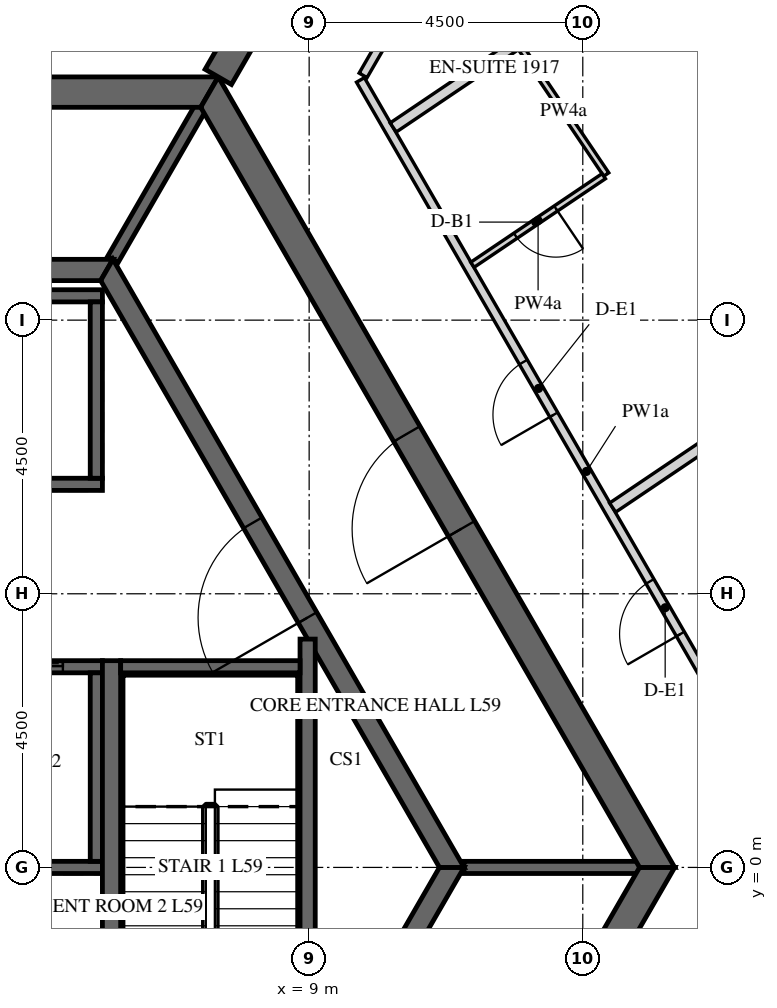
"""IFC4 building model, lengths in metres.
Left out: names, types, materials, properties, quantities, classifications, styles, units other than length and angle.
Written with IfcOpenShell. Run it as: python <this file> out.ifc"""

import sys

from ifc_helpers import new_model, si_unit, direction, frame, frame_2d, origin, place, context, subcontext, project, spatial, polyline, rectangle, outline, extrude, element, fill, save


model = new_model("IFC4")
c1 = context("Model", 3, precision=1e-05, world=origin(), true_north=direction((0.0, 1.0)))
c2 = subcontext(c1, "Body", "Model", "MODEL_VIEW")
j1 = project(units=[si_unit("LENGTHUNIT", "METRE"), si_unit("PLANEANGLEUNIT", "RADIAN")], contexts=[c1])
p1 = place(None, origin())
s1 = spatial("IfcSite", under=j1, at=p1, CompositionType="ELEMENT")
p2 = place(p1, origin())
s2 = spatial("IfcBuilding", under=s1, at=p2, CompositionType="ELEMENT")
p3 = place(p2, frame((0.0, 0.0, 246.3)))
s3 = spatial("IfcBuildingStorey", under=s2, at=p3, CompositionType="ELEMENT", Elevation=246.3)
p4 = place(p3, frame((7.361, -12.75, -0.15), z_axis=(0.0, 0.0, 1.0), x_axis=(0.50000571537, 0.866022103989, 0.0)))
e1 = element("IfcWall", 1, at=p4, inside=s3, PredefinedType="SHEAR", context=c2, shape_type="SweptSolid", body=[
    extrude(outline(polyline([(-0.144, -0.25), (14.867, -0.25), (14.578, 0.25), (0.144, 0.25), (-0.144, -0.25)])), origin(), (0.0, 0.0, 1.0), 3.75),
])
p5 = place(p4, frame((6.49, 0.0, 0.15)))
e2 = element("IfcOpeningElement", 2, at=p5, cuts=e1, PredefinedType="OPENING", context=c2, shape_type="SweptSolid", body=[
    extrude(rectangle(XDim=1.8, YDim=2.4, at=frame_2d((0.9, 1.2))), frame((0.0, 0.26, 0.0), z_axis=(0.0, -1.0, 0.0), x_axis=(1.0, 0.0, 0.0)), (0.0, 0.0, 1.0), 0.52),
])
p6 = place(p3, frame((14.722, 0.0, -0.15), z_axis=(0.0, 0.0, 1.0), x_axis=(-0.50000571537, 0.866022103989, 0.0)))
e3 = element("IfcWall", 3, at=p6, inside=s3, PredefinedType="SHEAR", context=c2, shape_type="SweptSolid", body=[
    extrude(outline(polyline([(-0.144, -0.25), (14.867, -0.25), (14.578, 0.25), (0.144, 0.25), (-0.144, -0.25)])), origin(), (0.0, 0.0, 1.0), 3.75),
])
p7 = place(p6, frame((6.432, 0.0, 0.15)))
e4 = element("IfcOpeningElement", 4, at=p7, cuts=e3, PredefinedType="OPENING", context=c2, shape_type="SweptSolid", body=[
    extrude(rectangle(XDim=1.8, YDim=2.4, at=frame_2d((0.9, 1.2))), frame((0.0, 0.26, 0.0), z_axis=(0.0, -1.0, 0.0), x_axis=(1.0, 0.0, 0.0)), (0.0, 0.0, 1.0), 0.52),
])
p8 = place(p3, frame((7.361, 12.75, -0.15), z_axis=(0.0, 0.0, 1.0), x_axis=(-1.0, 0.0, 0.0)))
e5 = element("IfcWall", 5, at=p8, inside=s3, PredefinedType="SHEAR", context=c2, shape_type="SweptSolid", body=[
    extrude(outline(polyline([(-0.144, -0.25), (14.866, -0.25), (14.578, 0.25), (0.144, 0.25), (-0.144, -0.25)])), origin(), (0.0, 0.0, 1.0), 3.75),
])
p9 = place(p8, frame((6.761, 0.0, 0.15)))
e6 = element("IfcOpeningElement", 6, at=p9, cuts=e5, PredefinedType="OPENING", context=c2, shape_type="SweptSolid", body=[
    extrude(rectangle(XDim=1.2, YDim=2.4, at=frame_2d((0.6, 1.2))), frame((0.0, 0.26, 0.0), z_axis=(0.0, -1.0, 0.0), x_axis=(1.0, 0.0, 0.0)), (0.0, 0.0, 1.0), 0.52),
])
p10 = place(p3, frame((7.506, 13.0, -0.15), z_axis=(0.0, 0.0, 1.0), x_axis=(0.499988271576, 0.866032175087, 0.0)))
e7 = element("IfcWall", 7, at=p10, inside=s3, PredefinedType="SHEAR", context=c2, shape_type="SweptSolid", body=[
    extrude(rectangle(XDim=15.424, YDim=0.5, at=frame_2d((7.712, 0.0))), origin(), (0.0, 0.0, 1.0), 3.75),
])
p11 = place(p10, frame((6.812, 0.0, 0.15)))
e8 = element("IfcOpeningElement", 8, at=p11, cuts=e7, PredefinedType="OPENING", context=c2, shape_type="SweptSolid", body=[
    extrude(rectangle(XDim=1.8, YDim=2.4, at=frame_2d((0.9, 1.2))), frame((0.0, 0.26, 0.0), z_axis=(0.0, -1.0, 0.0), x_axis=(1.0, 0.0, 0.0)), (0.0, 0.0, 1.0), 0.52),
])
p12 = place(p3, frame((5.673, -9.825, -0.15), z_axis=(0.0, 0.0, 1.0), x_axis=(0.499995046907, 0.866028263435, 0.0)))
e9 = element("IfcWall", 9, at=p12, inside=s3, PredefinedType="SHEAR", context=c2, shape_type="SweptSolid", body=[
    extrude(outline(polyline([(-0.101, -0.175), (11.446, -0.175), (11.244, 0.175), (0.101, 0.175), (-0.101, -0.175)])), origin(), (0.0, 0.0, 1.0), 3.75),
])
p13 = place(p12, frame((4.801, 0.0, 0.15)))
e10 = element("IfcOpeningElement", 10, at=p13, cuts=e9, PredefinedType="OPENING", context=c2, shape_type="SweptSolid", body=[
    extrude(rectangle(XDim=1.8, YDim=2.4, at=frame_2d((0.9, 1.2))), frame((0.0, 0.185, 0.0), z_axis=(0.0, -1.0, 0.0), x_axis=(1.0, 0.0, 0.0)), (0.0, 0.0, 1.0), 0.37),
])
p14 = place(p3, frame((11.345, 0.0, -0.15), z_axis=(0.0, 0.0, 1.0), x_axis=(-0.499995046907, 0.866028263435, 0.0)))
e11 = element("IfcWall", 11, at=p14, inside=s3, PredefinedType="SHEAR", context=c2, shape_type="SweptSolid", body=[
    extrude(outline(polyline([(-0.101, -0.175), (11.446, -0.175), (11.244, 0.175), (0.101, 0.175), (-0.101, -0.175)])), origin(), (0.0, 0.0, 1.0), 3.75),
])
p15 = place(p14, frame((4.744, 0.0, 0.15)))
e12 = element("IfcOpeningElement", 12, at=p15, cuts=e11, PredefinedType="OPENING", context=c2, shape_type="SweptSolid", body=[
    extrude(rectangle(XDim=1.8, YDim=2.4, at=frame_2d((0.9, 1.2))), frame((0.0, 0.185, 0.0), z_axis=(0.0, -1.0, 0.0), x_axis=(1.0, 0.0, 0.0)), (0.0, 0.0, 1.0), 0.37),
])
p16 = place(p3, frame((5.673, 9.825, -0.15), z_axis=(0.0, 0.0, 1.0), x_axis=(-1.0, 0.0, 0.0)))
e13 = element("IfcWall", 13, at=p16, inside=s3, PredefinedType="SHEAR", context=c2, shape_type="SweptSolid", body=[
    extrude(outline(polyline([(-0.101, -0.175), (11.446, -0.175), (11.244, 0.175), (0.101, 0.175), (-0.101, -0.175)])), origin(), (0.0, 0.0, 1.0), 3.75),
])
p17 = place(p3, frame((-5.6, 6.3, -0.25), z_axis=(0.0, 0.0, 1.0), x_axis=(1.0, 0.0, 0.0)))
e14 = element("IfcWall", 14, at=p17, inside=s3, PredefinedType="SHEAR", context=c2, shape_type="SweptSolid", body=[
    extrude(rectangle(XDim=11.2, YDim=0.2, at=frame_2d((5.6, 0.0))), origin(), (0.0, 0.0, 1.0), 3.9),
])
p18 = place(p17, frame((8.45, 0.0, 0.25)))
e15 = element("IfcOpeningElement", 15, at=p18, cuts=e14, PredefinedType="OPENING", context=c2, shape_type="SweptSolid", body=[
    extrude(rectangle(XDim=0.9, YDim=2.1, at=frame_2d((0.45, 1.05))), frame((0.0, 0.11, 0.0), z_axis=(0.0, -1.0, 0.0), x_axis=(1.0, 0.0, 0.0)), (0.0, 0.0, 1.0), 0.22),
])
p19 = place(p17, frame((0.65, 0.0, 0.25)))
e16 = element("IfcOpeningElement", 16, at=p19, cuts=e14, PredefinedType="OPENING", context=c2, shape_type="SweptSolid", body=[
    extrude(rectangle(XDim=1.1, YDim=2.1, at=frame_2d((0.55, 1.05))), frame((0.0, 0.11, 0.0), z_axis=(0.0, -1.0, 0.0), x_axis=(1.0, 0.0, 0.0)), (0.0, 0.0, 1.0), 0.22),
])
p20 = place(p17, frame((2.85, 0.0, 0.25)))
e17 = element("IfcOpeningElement", 17, at=p20, cuts=e14, PredefinedType="OPENING", context=c2, shape_type="SweptSolid", body=[
    extrude(rectangle(XDim=1.1, YDim=2.1, at=frame_2d((0.55, 1.05))), frame((0.0, 0.11, 0.0), z_axis=(0.0, -1.0, 0.0), x_axis=(1.0, 0.0, 0.0)), (0.0, 0.0, 1.0), 0.22),
])
p21 = place(p17, frame((5.05, 0.0, 0.25)))
e18 = element("IfcOpeningElement", 18, at=p21, cuts=e14, PredefinedType="OPENING", context=c2, shape_type="SweptSolid", body=[
    extrude(rectangle(XDim=1.1, YDim=2.1, at=frame_2d((0.55, 1.05))), frame((0.0, 0.11, 0.0), z_axis=(0.0, -1.0, 0.0), x_axis=(1.0, 0.0, 0.0)), (0.0, 0.0, 1.0), 0.22),
])
p22 = place(p3, frame((-5.6, 9.4, -0.25), z_axis=(0.0, 0.0, 1.0), x_axis=(1.0, 0.0, 0.0)))
e19 = element("IfcWall", 19, at=p22, inside=s3, PredefinedType="SHEAR", context=c2, shape_type="SweptSolid", body=[
    extrude(rectangle(XDim=11.2, YDim=0.2, at=frame_2d((5.6, 0.0))), origin(), (0.0, 0.0, 1.0), 3.9),
])
p23 = place(p3, frame((5.5, 6.4, -0.25), z_axis=(0.0, 0.0, 1.0), x_axis=(0.0, 1.0, 0.0)))
e20 = element("IfcWall", 20, at=p23, inside=s3, PredefinedType="SHEAR", context=c2, shape_type="SweptSolid", body=[
    extrude(rectangle(XDim=2.9, YDim=0.2, at=frame_2d((1.45, 0.0))), origin(), (0.0, 0.0, 1.0), 3.9),
])
p24 = place(p3, frame((-5.6, 3.3, -0.25), z_axis=(0.0, 0.0, 1.0), x_axis=(1.0, 0.0, 0.0)))
e21 = element("IfcWall", 21, at=p24, inside=s3, PredefinedType="SHEAR", context=c2, shape_type="SweptSolid", body=[
    extrude(rectangle(XDim=11.2, YDim=0.2, at=frame_2d((5.6, 0.0))), origin(), (0.0, 0.0, 1.0), 3.9),
])
p25 = place(p24, frame((0.65, 0.0, 0.25)))
e22 = element("IfcOpeningElement", 22, at=p25, cuts=e21, PredefinedType="OPENING", context=c2, shape_type="SweptSolid", body=[
    extrude(rectangle(XDim=1.1, YDim=2.1, at=frame_2d((0.55, 1.05))), frame((0.0, 0.11, 0.0), z_axis=(0.0, -1.0, 0.0), x_axis=(1.0, 0.0, 0.0)), (0.0, 0.0, 1.0), 0.22),
])
p26 = place(p24, frame((2.85, 0.0, 0.25)))
e23 = element("IfcOpeningElement", 23, at=p26, cuts=e21, PredefinedType="OPENING", context=c2, shape_type="SweptSolid", body=[
    extrude(rectangle(XDim=1.1, YDim=2.1, at=frame_2d((0.55, 1.05))), frame((0.0, 0.11, 0.0), z_axis=(0.0, -1.0, 0.0), x_axis=(1.0, 0.0, 0.0)), (0.0, 0.0, 1.0), 0.22),
])
p27 = place(p24, frame((5.05, 0.0, 0.25)))
e24 = element("IfcOpeningElement", 24, at=p27, cuts=e21, PredefinedType="OPENING", context=c2, shape_type="SweptSolid", body=[
    extrude(rectangle(XDim=1.1, YDim=2.1, at=frame_2d((0.55, 1.05))), frame((0.0, 0.11, 0.0), z_axis=(0.0, -1.0, 0.0), x_axis=(1.0, 0.0, 0.0)), (0.0, 0.0, 1.0), 0.22),
])
p28 = place(p24, frame((7.25, 0.0, 0.25)))
e25 = element("IfcOpeningElement", 25, at=p28, cuts=e21, PredefinedType="OPENING", context=c2, shape_type="SweptSolid", body=[
    extrude(rectangle(XDim=1.1, YDim=2.1, at=frame_2d((0.55, 1.05))), frame((0.0, 0.11, 0.0), z_axis=(0.0, -1.0, 0.0), x_axis=(1.0, 0.0, 0.0)), (0.0, 0.0, 1.0), 0.22),
])
p29 = place(p24, frame((9.45, 0.0, 0.25)))
e26 = element("IfcOpeningElement", 26, at=p29, cuts=e21, PredefinedType="OPENING", context=c2, shape_type="SweptSolid", body=[
    extrude(rectangle(XDim=1.1, YDim=2.1, at=frame_2d((0.55, 1.05))), frame((0.0, 0.11, 0.0), z_axis=(0.0, -1.0, 0.0), x_axis=(1.0, 0.0, 0.0)), (0.0, 0.0, 1.0), 0.22),
])
p30 = place(p3, frame((-5.6, 0.0, -0.25), z_axis=(0.0, 0.0, 1.0), x_axis=(1.0, 0.0, 0.0)))
e27 = element("IfcWall", 27, at=p30, inside=s3, PredefinedType="SHEAR", context=c2, shape_type="SweptSolid", body=[
    extrude(rectangle(XDim=11.2, YDim=0.2, at=frame_2d((5.6, 0.0))), origin(), (0.0, 0.0, 1.0), 3.9),
])
p31 = place(p3, frame((5.5, 0.1, -0.25), z_axis=(0.0, 0.0, 1.0), x_axis=(0.0, 1.0, 0.0)))
e28 = element("IfcWall", 28, at=p31, inside=s3, PredefinedType="SHEAR", context=c2, shape_type="SweptSolid", body=[
    extrude(rectangle(XDim=3.1, YDim=0.2, at=frame_2d((1.55, 0.0))), origin(), (0.0, 0.0, 1.0), 3.9),
])
for number, where, z_axis, x_axis in (
    (29, (11.547, 0.0, -0.15), (0.0, 0.0, 1.0), (1.0, 0.0, 0.0)),
    (30, (5.773, 10.0, -0.15), (0.0, 0.0, 1.0), (0.5, 0.866, 0.0)),
):
    element("IfcWall", number, at=place(p3, frame(where, z_axis=z_axis, x_axis=x_axis)), inside=s3, PredefinedType="SHEAR", context=c2, shape_type="SweptSolid", body=[
        extrude(rectangle(XDim=2.887, YDim=0.2, at=frame_2d((1.443, 0.0))), origin(), (0.0, 0.0, 1.0), 3.75),
    ])
p32 = place(p3, frame((5.75, -3.4, -0.25), z_axis=(0.0, 0.0, 1.0), x_axis=(0.0, 1.0, 0.0)))
e31 = element("IfcWall", 31, at=p32, inside=s3, PredefinedType="SHEAR", context=c2, shape_type="SweptSolid", body=[
    extrude(rectangle(XDim=6.8, YDim=0.3, at=frame_2d((3.4, 0.0))), origin(), (0.0, 0.0, 1.0), 3.9),
])
p33 = place(p3, frame((8.975, -3.755, -0.25), z_axis=(0.0, 0.0, 1.0), x_axis=(0.0, 1.0, 0.0)))
e32 = element("IfcWall", 32, at=p33, inside=s3, PredefinedType="SHEAR", context=c2, shape_type="SweptSolid", body=[
    extrude(rectangle(XDim=7.51, YDim=0.25, at=frame_2d((3.755, 0.0))), origin(), (0.0, 0.0, 1.0), 3.9),
])
p34 = place(p3, frame((5.9, 3.3, -0.25), z_axis=(0.0, 0.0, 1.0), x_axis=(1.0, 0.0, 0.0)))
e33 = element("IfcWall", 33, at=p34, inside=s3, PredefinedType="SHEAR", context=c2, shape_type="SweptSolid", body=[
    extrude(rectangle(XDim=2.95, YDim=0.2, at=frame_2d((1.475, 0.0))), origin(), (0.0, 0.0, 1.0), 3.9),
])
p35 = place(p3, frame((9.887, -12.875, 0.0), z_axis=(0.0, 0.0, 1.0), x_axis=(0.499998228944, 0.866026426302, 0.0)))
e34 = element("IfcWall", 34, at=p35, inside=s3, PredefinedType="PARTITIONING", context=c2, shape_type="SweptSolid", body=[
    extrude(rectangle(XDim=14.867, YDim=0.15, at=frame_2d((7.433, 0.0))), origin(), (0.0, 0.0, 1.0), 2.838),
])
p36 = place(p35, frame((3.519, 0.0, 0.0)))
e35 = element("IfcOpeningElement", 35, at=p36, cuts=e34, PredefinedType="OPENING", context=c2, shape_type="SweptSolid", body=[
    extrude(rectangle(XDim=1.0, YDim=2.1, at=frame_2d((0.5, 1.05))), frame((0.0, 0.085, 0.0), z_axis=(0.0, -1.0, 0.0), x_axis=(1.0, 0.0, 0.0)), (0.0, 0.0, 1.0), 0.17),
])
p37 = place(p35, frame((7.324, 0.0, 0.0)))
e36 = element("IfcOpeningElement", 36, at=p37, cuts=e34, PredefinedType="OPENING", context=c2, shape_type="SweptSolid", body=[
    extrude(rectangle(XDim=1.0, YDim=2.1, at=frame_2d((0.5, 1.05))), frame((0.0, 0.085, 0.0), z_axis=(0.0, -1.0, 0.0), x_axis=(1.0, 0.0, 0.0)), (0.0, 0.0, 1.0), 0.17),
])
p38 = place(p35, frame((13.717, 0.0, 0.0)))
e37 = element("IfcOpeningElement", 37, at=p38, cuts=e34, PredefinedType="OPENING", context=c2, shape_type="SweptSolid", body=[
    extrude(rectangle(XDim=1.0, YDim=2.1, at=frame_2d((0.5, 1.05))), frame((0.0, 0.085, 0.0), z_axis=(0.0, -1.0, 0.0), x_axis=(1.0, 0.0, 0.0)), (0.0, 0.0, 1.0), 0.17),
])
p39 = place(p3, frame((17.277, 0.075, 0.0), z_axis=(0.0, 0.0, 1.0), x_axis=(-0.499998228944, 0.866026426302, 0.0)))
e38 = element("IfcWall", 38, at=p39, inside=s3, PredefinedType="PARTITIONING", context=c2, shape_type="SweptSolid", body=[
    extrude(rectangle(XDim=14.867, YDim=0.15, at=frame_2d((7.433, 0.0))), origin(), (0.0, 0.0, 1.0), 2.838),
])
p40 = place(p39, frame((4.345, 0.0, 0.0)))
e39 = element("IfcOpeningElement", 39, at=p40, cuts=e38, PredefinedType="OPENING", context=c2, shape_type="SweptSolid", body=[
    extrude(rectangle(XDim=1.0, YDim=2.1, at=frame_2d((0.5, 1.05))), frame((0.0, 0.085, 0.0), z_axis=(0.0, -1.0, 0.0), x_axis=(1.0, 0.0, 0.0)), (0.0, 0.0, 1.0), 0.17),
])
p41 = place(p39, frame((8.51, 0.0, 0.0)))
e40 = element("IfcOpeningElement", 40, at=p41, cuts=e38, PredefinedType="OPENING", context=c2, shape_type="SweptSolid", body=[
    extrude(rectangle(XDim=1.0, YDim=2.1, at=frame_2d((0.5, 1.05))), frame((0.0, 0.085, 0.0), z_axis=(0.0, -1.0, 0.0), x_axis=(1.0, 0.0, 0.0)), (0.0, 0.0, 1.0), 0.17),
])
p42 = place(p3, frame((9.887, 13.025, 0.0), z_axis=(0.0, 0.0, 1.0), x_axis=(0.499985955615, 0.866033512162, 0.0)))
e41 = element("IfcWall", 41, at=p42, inside=s3, PredefinedType="PARTITIONING", context=c2, shape_type="SweptSolid", body=[
    extrude(rectangle(XDim=7.699, YDim=0.15, at=frame_2d((3.85, 0.0))), origin(), (0.0, 0.0, 1.0), 2.838),
])
p43 = place(p42, frame((2.106, 0.0, 0.0)))
e42 = element("IfcOpeningElement", 42, at=p43, cuts=e41, PredefinedType="OPENING", context=c2, shape_type="SweptSolid", body=[
    extrude(rectangle(XDim=1.0, YDim=2.1, at=frame_2d((0.5, 1.05))), frame((0.0, 0.085, 0.0), z_axis=(0.0, -1.0, 0.0), x_axis=(1.0, 0.0, 0.0)), (0.0, 0.0, 1.0), 0.17),
])
p44 = place(p3, frame((24.389, 12.931, 0.0), z_axis=(0.0, 0.0, 1.0), x_axis=(-0.829040439793, -0.559188652593, 0.0)))
e43 = element("IfcWall", 43, at=p44, inside=s3, PredefinedType="PARTITIONING", context=c2, shape_type="SweptSolid", body=[
    extrude(rectangle(XDim=12.542, YDim=0.18, at=frame_2d((6.271, 0.0))), origin(), (0.0, 0.0, 1.0), 2.838),
])
p45 = place(p3, frame((12.483, 13.476, 0.0), z_axis=(0.0, 0.0, 1.0), x_axis=(0.559203861497, -0.829030181168, 0.0)))
e44 = element("IfcWall", 44, at=p45, inside=s3, PredefinedType="PARTITIONING", context=c2, shape_type="SweptSolid", body=[
    extrude(rectangle(XDim=2.51, YDim=0.1, at=frame_2d((1.255, 0.0))), origin(), (0.0, 0.0, 1.0), 2.838),
])
p46 = place(p3, frame((13.845, 11.367, 0.0), z_axis=(0.0, 0.0, 1.0), x_axis=(-0.829068087245, -0.55914766092, 0.0)))
e45 = element("IfcWall", 45, at=p46, inside=s3, PredefinedType="PARTITIONING", context=c2, shape_type="SweptSolid", body=[
    extrude(rectangle(XDim=2.605, YDim=0.1, at=frame_2d((1.302, 0.0))), origin(), (0.0, 0.0, 1.0), 2.838),
])
p47 = place(p46, frame((0.95, 0.0, 0.0)))
e46 = element("IfcOpeningElement", 46, at=p47, cuts=e45, PredefinedType="OPENING", context=c2, shape_type="SweptSolid", body=[
    extrude(rectangle(XDim=0.8, YDim=2.1, at=frame_2d((0.4, 1.05))), frame((0.0, 0.06, 0.0), z_axis=(0.0, -1.0, 0.0), x_axis=(1.0, 0.0, 0.0)), (0.0, 0.0, 1.0), 0.12),
])
p48 = place(p3, frame((20.363, 18.9, 0.0), z_axis=(0.0, 0.0, 1.0), x_axis=(-0.829027307641, -0.559208121531, 0.0)))
e47 = element("IfcWall", 47, at=p48, inside=s3, PredefinedType="PARTITIONING", context=c2, shape_type="SweptSolid", body=[
    extrude(rectangle(XDim=12.039, YDim=0.18, at=frame_2d((6.02, 0.0))), origin(), (0.0, 0.0, 1.0), 2.838),
])
p49 = place(p7, origin())
e48 = element("IfcDoor", 48, at=p49, inside=s3, OperationType="DOUBLE_DOOR_SINGLE_SWING", PredefinedType="DOOR", context=c2, shape_type="SweptSolid", body=[
    extrude(rectangle(XDim=1.8, YDim=2.4, at=frame_2d((0.9, 1.2))), frame((0.0, 0.025, 0.0), z_axis=(0.0, -1.0, 0.0), x_axis=(1.0, 0.0, 0.0)), (0.0, 0.0, 1.0), 0.05),
])
fill(e4, e48)
p50 = place(p15, origin())
e49 = element("IfcDoor", 49, at=p50, inside=s3, OperationType="DOUBLE_DOOR_SINGLE_SWING", PredefinedType="DOOR", context=c2, shape_type="SweptSolid", body=[
    extrude(rectangle(XDim=1.8, YDim=2.4, at=frame_2d((0.9, 1.2))), frame((0.0, 0.025, 0.0), z_axis=(0.0, -1.0, 0.0), x_axis=(1.0, 0.0, 0.0)), (0.0, 0.0, 1.0), 0.05),
])
fill(e12, e49)
p51 = place(p29, origin())
e50 = element("IfcDoor", 50, at=p51, inside=s3, OperationType="SLIDING_TO_LEFT", PredefinedType="DOOR", context=c2, shape_type="SweptSolid", body=[
    extrude(rectangle(XDim=1.1, YDim=2.1, at=frame_2d((0.55, 1.05))), frame((0.0, 0.025, 0.0), z_axis=(0.0, -1.0, 0.0), x_axis=(1.0, 0.0, 0.0)), (0.0, 0.0, 1.0), 0.05),
])
fill(e26, e50)
p52 = place(p40, origin())
e51 = element("IfcDoor", 51, at=p52, inside=s3, OperationType="SINGLE_SWING_LEFT", PredefinedType="DOOR", context=c2, shape_type="SweptSolid", body=[
    extrude(rectangle(XDim=1.0, YDim=2.1, at=frame_2d((0.5, 1.05))), frame((0.0, 0.025, 0.0), z_axis=(0.0, -1.0, 0.0), x_axis=(1.0, 0.0, 0.0)), (0.0, 0.0, 1.0), 0.05),
])
fill(e39, e51)
p53 = place(p41, origin())
e52 = element("IfcDoor", 52, at=p53, inside=s3, OperationType="SINGLE_SWING_RIGHT", PredefinedType="DOOR", context=c2, shape_type="SweptSolid", body=[
    extrude(rectangle(XDim=1.0, YDim=2.1, at=frame_2d((0.5, 1.05))), frame((0.0, 0.025, 0.0), z_axis=(0.0, -1.0, 0.0), x_axis=(1.0, 0.0, 0.0)), (0.0, 0.0, 1.0), 0.05),
])
fill(e40, e52)
p54 = place(p47, origin())
e53 = element("IfcDoor", 53, at=p54, inside=s3, OperationType="SINGLE_SWING_LEFT", PredefinedType="DOOR", context=c2, shape_type="SweptSolid", body=[
    extrude(rectangle(XDim=0.8, YDim=2.1, at=frame_2d((0.4, 1.05))), frame((0.0, 0.025, 0.0), z_axis=(0.0, -1.0, 0.0), x_axis=(1.0, 0.0, 0.0)), (0.0, 0.0, 1.0), 0.05),
])
fill(e46, e53)
save(model, sys.argv[1])
